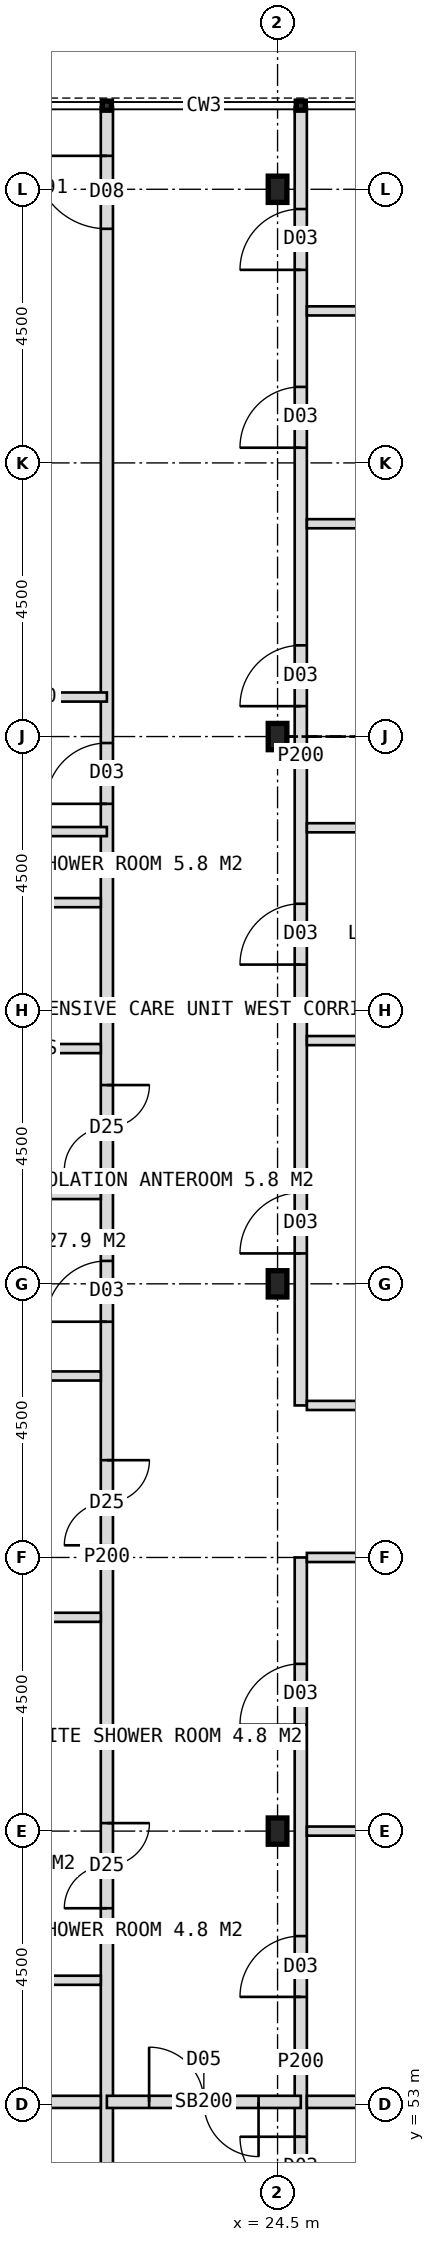
"""IFC4 building model, lengths in metres.
Left out: names, types, materials, properties, quantities, classifications, styles, units other than length and angle.
Written with IfcOpenShell. Run it as: python <this file> out.ifc"""

import sys

from ifc_helpers import new_model, si_unit, direction, frame, frame_2d, origin, origin_2d, place, context, subcontext, project, spatial, rectangle, i_section, extrude, element, fill, save


model = new_model("IFC4")
c1 = context("Model", 3, precision=1e-05, world=origin(), true_north=direction((0.0, 1.0)))
c2 = subcontext(c1, "Body", "Model", "MODEL_VIEW")
j1 = project(units=[si_unit("LENGTHUNIT", "METRE"), si_unit("PLANEANGLEUNIT", "RADIAN")], contexts=[c1])
p1 = place(None, origin())
s1 = spatial("IfcSite", under=j1, at=p1, CompositionType="ELEMENT")
p2 = place(p1, origin())
s2 = spatial("IfcBuilding", under=s1, at=p2, CompositionType="ELEMENT")
p3 = place(p2, frame((0.0, 0.0, 21.0)))
s3 = spatial("IfcBuildingStorey", under=s2, at=p3, CompositionType="ELEMENT", Elevation=21.0)
for number, where, z_axis, x_axis in (
    (1, (24.5, 57.5, 0.0), (0.0, 0.0, 1.0), (1.0, 0.0, 0.0)),
    (2, (24.5, 66.5, 0.0), (0.0, 0.0, 1.0), (1.0, 0.0, 0.0)),
    (3, (24.5, 75.5, 0.0), (0.0, 0.0, 1.0), (1.0, 0.0, 0.0)),
    (4, (24.5, 84.5, 0.0), (0.0, 0.0, 1.0), (1.0, 0.0, 0.0)),
):
    element("IfcColumn", number, at=place(p3, frame(where, z_axis=z_axis, x_axis=x_axis)), inside=s3, PredefinedType="COLUMN", context=c2, shape_type="SweptSolid", body=[
        extrude(i_section(OverallWidth=0.307, OverallDepth=0.432, WebThickness=0.021, FlangeThickness=0.04, FilletRadius=0.027, at=origin_2d()), origin(), (0.0, 0.0, 1.0), 5.0),
    ])
p4 = place(p3, frame((21.693, 38.15, 0.0), z_axis=(0.0, 0.0, 1.0), x_axis=(0.0, 1.0, 0.0)))
e5 = element("IfcWall", 5, at=p4, inside=s3, PredefinedType="PARTITIONING", context=c2, shape_type="SweptSolid", body=[
    extrude(rectangle(XDim=47.7, YDim=0.2, at=frame_2d((23.85, 0.0))), origin(), (0.0, 0.0, 1.0), 4.7),
])
p5 = place(p4, frame((45.7, 0.0, 0.0)))
e6 = element("IfcOpeningElement", 6, at=p5, cuts=e5, PredefinedType="OPENING", context=c2, shape_type="SweptSolid", body=[
    extrude(rectangle(XDim=1.2, YDim=2.1, at=frame_2d((0.6, 1.05))), frame((0.0, 0.11, 0.0), z_axis=(0.0, -1.0, 0.0), x_axis=(1.0, 0.0, 0.0)), (0.0, 0.0, 1.0), 0.22),
])
p6 = place(p4, frame((36.244, 0.0, 0.0)))
e7 = element("IfcOpeningElement", 7, at=p6, cuts=e5, PredefinedType="OPENING", context=c2, shape_type="SweptSolid", body=[
    extrude(rectangle(XDim=1.0, YDim=2.1, at=frame_2d((0.5, 1.05))), frame((0.0, 0.11, 0.0), z_axis=(0.0, -1.0, 0.0), x_axis=(1.0, 0.0, 0.0)), (0.0, 0.0, 1.0), 0.22),
])
p7 = place(p4, frame((0.5, 0.0, 0.0)))
e8 = element("IfcOpeningElement", 8, at=p7, cuts=e5, PredefinedType="OPENING", context=c2, shape_type="SweptSolid", body=[
    extrude(rectangle(XDim=1.4, YDim=2.2, at=frame_2d((0.7, 1.1))), frame((0.0, 0.11, 0.0), z_axis=(0.0, -1.0, 0.0), x_axis=(1.0, 0.0, 0.0)), (0.0, 0.0, 1.0), 0.22),
])
p8 = place(p4, frame((30.219, 0.0, 0.0)))
e9 = element("IfcOpeningElement", 9, at=p8, cuts=e5, PredefinedType="OPENING", context=c2, shape_type="SweptSolid", body=[
    extrude(rectangle(XDim=1.4, YDim=2.2, at=frame_2d((0.7, 1.1))), frame((0.0, 0.11, 0.0), z_axis=(0.0, -1.0, 0.0), x_axis=(1.0, 0.0, 0.0)), (0.0, 0.0, 1.0), 0.22),
])
p9 = place(p4, frame((9.128, 0.0, 0.0)))
e10 = element("IfcOpeningElement", 10, at=p9, cuts=e5, PredefinedType="OPENING", context=c2, shape_type="SweptSolid", body=[
    extrude(rectangle(XDim=1.4, YDim=2.2, at=frame_2d((0.7, 1.1))), frame((0.0, 0.11, 0.0), z_axis=(0.0, -1.0, 0.0), x_axis=(1.0, 0.0, 0.0)), (0.0, 0.0, 1.0), 0.22),
])
p10 = place(p4, frame((12.805, 0.0, 0.0)))
e11 = element("IfcOpeningElement", 11, at=p10, cuts=e5, PredefinedType="OPENING", context=c2, shape_type="SweptSolid", body=[
    extrude(rectangle(XDim=1.0, YDim=2.1, at=frame_2d((0.5, 1.05))), frame((0.0, 0.11, 0.0), z_axis=(0.0, -1.0, 0.0), x_axis=(1.0, 0.0, 0.0)), (0.0, 0.0, 1.0), 0.22),
])
p11 = place(p4, frame((18.081, 0.0, 0.0)))
e12 = element("IfcOpeningElement", 12, at=p11, cuts=e5, PredefinedType="OPENING", context=c2, shape_type="SweptSolid", body=[
    extrude(rectangle(XDim=1.4, YDim=2.2, at=frame_2d((0.7, 1.1))), frame((0.0, 0.11, 0.0), z_axis=(0.0, -1.0, 0.0), x_axis=(1.0, 0.0, 0.0)), (0.0, 0.0, 1.0), 0.22),
])
p12 = place(p4, frame((24.05, 0.0, 0.0)))
e13 = element("IfcOpeningElement", 13, at=p12, cuts=e5, PredefinedType="OPENING", context=c2, shape_type="SweptSolid", body=[
    extrude(rectangle(XDim=1.4, YDim=2.2, at=frame_2d((0.7, 1.1))), frame((0.0, 0.11, 0.0), z_axis=(0.0, -1.0, 0.0), x_axis=(1.0, 0.0, 0.0)), (0.0, 0.0, 1.0), 0.22),
])
p13 = place(p4, frame((27.727, 0.0, 0.0)))
e14 = element("IfcOpeningElement", 14, at=p13, cuts=e5, PredefinedType="OPENING", context=c2, shape_type="SweptSolid", body=[
    extrude(rectangle(XDim=1.0, YDim=2.1, at=frame_2d((0.5, 1.05))), frame((0.0, 0.11, 0.0), z_axis=(0.0, -1.0, 0.0), x_axis=(1.0, 0.0, 0.0)), (0.0, 0.0, 1.0), 0.22),
])
p14 = place(p3, frame((24.882, 45.4, 0.0), z_axis=(0.0, 0.0, 1.0), x_axis=(0.0, 1.0, 0.0)))
e15 = element("IfcWall", 15, at=p14, inside=s3, PredefinedType="PARTITIONING", context=c2, shape_type="SweptSolid", body=[
    extrude(rectangle(XDim=16.6, YDim=0.2, at=frame_2d((8.3, 0.0))), origin(), (0.0, 0.0, 1.0), 4.7),
])
p15 = place(p14, frame((1.15, 0.0, 0.0)))
e16 = element("IfcOpeningElement", 16, at=p15, cuts=e15, PredefinedType="OPENING", context=c2, shape_type="SweptSolid", body=[
    extrude(rectangle(XDim=1.6, YDim=2.2, at=frame_2d((0.8, 1.1))), frame((0.0, 0.11, 0.0), z_axis=(0.0, -1.0, 0.0), x_axis=(1.0, 0.0, 0.0)), (0.0, 0.0, 1.0), 0.22),
])
p16 = place(p14, frame((6.073, 0.0, 0.0)))
e17 = element("IfcOpeningElement", 17, at=p16, cuts=e15, PredefinedType="OPENING", context=c2, shape_type="SweptSolid", body=[
    extrude(rectangle(XDim=1.0, YDim=2.1, at=frame_2d((0.5, 1.05))), frame((0.0, 0.11, 0.0), z_axis=(0.0, -1.0, 0.0), x_axis=(1.0, 0.0, 0.0)), (0.0, 0.0, 1.0), 0.22),
])
p17 = place(p14, frame((9.374, 0.0, 0.0)))
e18 = element("IfcOpeningElement", 18, at=p17, cuts=e15, PredefinedType="OPENING", context=c2, shape_type="SweptSolid", body=[
    extrude(rectangle(XDim=1.0, YDim=2.1, at=frame_2d((0.5, 1.05))), frame((0.0, 0.11, 0.0), z_axis=(0.0, -1.0, 0.0), x_axis=(1.0, 0.0, 0.0)), (0.0, 0.0, 1.0), 0.22),
])
p18 = place(p14, frame((13.85, 0.0, 0.0)))
e19 = element("IfcOpeningElement", 19, at=p18, cuts=e15, PredefinedType="OPENING", context=c2, shape_type="SweptSolid", body=[
    extrude(rectangle(XDim=1.0, YDim=2.1, at=frame_2d((0.5, 1.05))), frame((0.0, 0.11, 0.0), z_axis=(0.0, -1.0, 0.0), x_axis=(1.0, 0.0, 0.0)), (0.0, 0.0, 1.0), 0.22),
])
p19 = place(p3, frame((24.882, 64.5, 0.0), z_axis=(0.0, 0.0, 1.0), x_axis=(0.0, 1.0, 0.0)))
e20 = element("IfcWall", 20, at=p19, inside=s3, PredefinedType="PARTITIONING", context=c2, shape_type="SweptSolid", body=[
    extrude(rectangle(XDim=21.35, YDim=0.2, at=frame_2d((10.675, 0.0))), origin(), (0.0, 0.0, 1.0), 4.7),
])
p20 = place(p19, frame((2.5, 0.0, 0.0)))
e21 = element("IfcOpeningElement", 21, at=p20, cuts=e20, PredefinedType="OPENING", context=c2, shape_type="SweptSolid", body=[
    extrude(rectangle(XDim=1.0, YDim=2.1, at=frame_2d((0.5, 1.05))), frame((0.0, 0.11, 0.0), z_axis=(0.0, -1.0, 0.0), x_axis=(1.0, 0.0, 0.0)), (0.0, 0.0, 1.0), 0.22),
])
p21 = place(p19, frame((7.25, 0.0, 0.0)))
e22 = element("IfcOpeningElement", 22, at=p21, cuts=e20, PredefinedType="OPENING", context=c2, shape_type="SweptSolid", body=[
    extrude(rectangle(XDim=1.0, YDim=2.1, at=frame_2d((0.5, 1.05))), frame((0.0, 0.11, 0.0), z_axis=(0.0, -1.0, 0.0), x_axis=(1.0, 0.0, 0.0)), (0.0, 0.0, 1.0), 0.22),
])
p22 = place(p19, frame((11.5, 0.0, 0.0)))
e23 = element("IfcOpeningElement", 23, at=p22, cuts=e20, PredefinedType="OPENING", context=c2, shape_type="SweptSolid", body=[
    extrude(rectangle(XDim=1.0, YDim=2.1, at=frame_2d((0.5, 1.05))), frame((0.0, 0.11, 0.0), z_axis=(0.0, -1.0, 0.0), x_axis=(1.0, 0.0, 0.0)), (0.0, 0.0, 1.0), 0.22),
])
p23 = place(p19, frame((15.75, 0.0, 0.0)))
e24 = element("IfcOpeningElement", 24, at=p23, cuts=e20, PredefinedType="OPENING", context=c2, shape_type="SweptSolid", body=[
    extrude(rectangle(XDim=1.0, YDim=2.1, at=frame_2d((0.5, 1.05))), frame((0.0, 0.11, 0.0), z_axis=(0.0, -1.0, 0.0), x_axis=(1.0, 0.0, 0.0)), (0.0, 0.0, 1.0), 0.22),
])
p24 = place(p19, frame((18.675, 0.0, 0.0)))
e25 = element("IfcOpeningElement", 25, at=p24, cuts=e20, PredefinedType="OPENING", context=c2, shape_type="SweptSolid", body=[
    extrude(rectangle(XDim=1.0, YDim=2.1, at=frame_2d((0.5, 1.05))), frame((0.0, 0.11, 0.0), z_axis=(0.0, -1.0, 0.0), x_axis=(1.0, 0.0, 0.0)), (0.0, 0.0, 1.0), 0.22),
])
p25 = place(p3, frame((21.693, 53.047, 0.0), z_axis=(0.0, 0.0, 1.0), x_axis=(1.0, 0.0, 0.0)))
e26 = element("IfcWall", 26, at=p25, inside=s3, PredefinedType="SOLIDWALL", context=c2, shape_type="SweptSolid", body=[
    extrude(rectangle(XDim=3.189, YDim=0.2, at=frame_2d((1.594, 0.0))), origin(), (0.0, 0.0, 1.0), 4.7),
])
p26 = place(p25, frame((0.695, 0.0, 0.0)))
e27 = element("IfcOpeningElement", 27, at=p26, cuts=e26, PredefinedType="OPENING", context=c2, shape_type="SweptSolid", body=[
    extrude(rectangle(XDim=1.8, YDim=2.2, at=frame_2d((0.9, 1.1))), frame((0.0, 0.11, 0.0), z_axis=(0.0, -1.0, 0.0), x_axis=(1.0, 0.0, 0.0)), (0.0, 0.0, 1.0), 0.22),
])
p27 = place(p3, frame((19.3, 76.15, 0.0), z_axis=(0.0, 0.0, 1.0), x_axis=(1.0, 0.0, 0.0)))
e28 = element("IfcWall", 28, at=p27, inside=s3, PredefinedType="PARTITIONING", context=c2, shape_type="SweptSolid", body=[
    extrude(rectangle(XDim=2.393, YDim=0.15, at=frame_2d((1.197, 0.0))), origin(), (0.0, 0.0, 1.0), 4.7),
])
p28 = place(p3, frame((12.15, 73.938, 0.0), z_axis=(0.0, 0.0, 1.0), x_axis=(1.0, 0.0, 0.0)))
e29 = element("IfcWall", 29, at=p28, inside=s3, PredefinedType="PARTITIONING", context=c2, shape_type="SweptSolid", body=[
    extrude(rectangle(XDim=9.543, YDim=0.15, at=frame_2d((4.771, 0.0))), origin(), (0.0, 0.0, 1.0), 4.7),
])
p29 = place(p3, frame((12.15, 53.047, 0.0), z_axis=(0.0, 0.0, 1.0), x_axis=(1.0, 0.0, 0.0)))
e30 = element("IfcWall", 30, at=p29, inside=s3, PredefinedType="SOLIDWALL", context=c2, shape_type="SweptSolid", body=[
    extrude(rectangle(XDim=9.443, YDim=0.2, at=frame_2d((4.722, 0.0))), origin(), (0.0, 0.0, 1.0), 4.7),
])
for number, where, z_axis, x_axis in (
    (31, (12.15, 59.016, 0.0), (0.0, 0.0, 1.0), (1.0, 0.0, 0.0)),
    (32, (12.15, 64.984, 0.0), (0.0, 0.0, 1.0), (1.0, 0.0, 0.0)),
    (33, (12.15, 67.969, 0.0), (0.0, 0.0, 1.0), (1.0, 0.0, 0.0)),
):
    element("IfcWall", number, at=place(p3, frame(where, z_axis=z_axis, x_axis=x_axis)), inside=s3, PredefinedType="PARTITIONING", context=c2, shape_type="SweptSolid", body=[
        extrude(rectangle(XDim=9.443, YDim=0.15, at=frame_2d((4.722, 0.0))), origin(), (0.0, 0.0, 1.0), 4.7),
    ])
for number, where, z_axis, x_axis in (
    (34, (21.593, 55.047, 0.0), (0.0, 0.0, 1.0), (-1.0, 0.0, 0.0)),
    (35, (21.593, 61.016, 0.0), (0.0, 0.0, 1.0), (-1.0, 0.0, 0.0)),
    (36, (21.593, 70.369, 0.0), (0.0, 0.0, 1.0), (-1.0, 0.0, 0.0)),
    (37, (21.593, 72.769, 0.0), (0.0, 0.0, 1.0), (-1.0, 0.0, 0.0)),
):
    element("IfcWall", number, at=place(p3, frame(where, z_axis=z_axis, x_axis=x_axis)), inside=s3, PredefinedType="PARTITIONING", context=c2, shape_type="SweptSolid", body=[
        extrude(rectangle(XDim=2.4, YDim=0.15, at=frame_2d((1.2, 0.0))), origin(), (0.0, 0.0, 1.0), 4.7),
    ])
p30 = place(p3, frame((24.982, 53.047, 0.0), z_axis=(0.0, 0.0, 1.0), x_axis=(1.0, 0.0, 0.0)))
e38 = element("IfcWall", 38, at=p30, inside=s3, PredefinedType="SOLIDWALL", context=c2, shape_type="SweptSolid", body=[
    extrude(rectangle(XDim=9.168, YDim=0.2, at=frame_2d((4.584, 0.0))), origin(), (0.0, 0.0, 1.0), 4.7),
])
p31 = place(p3, frame((24.982, 57.5, 0.0), z_axis=(0.0, 0.0, 1.0), x_axis=(1.0, 0.0, 0.0)))
e39 = element("IfcWall", 39, at=p31, inside=s3, PredefinedType="PARTITIONING", context=c2, shape_type="SweptSolid", body=[
    extrude(rectangle(XDim=8.365, YDim=0.15, at=frame_2d((4.182, 0.0))), origin(), (0.0, 0.0, 1.0), 3.7),
])
for number, where, z_axis, x_axis in (
    (40, (24.982, 62.0, 0.0), (0.0, 0.0, 1.0), (1.0, 0.0, 0.0)),
    (41, (24.982, 64.5, 0.0), (0.0, 0.0, 1.0), (1.0, 0.0, 0.0)),
    (42, (24.982, 70.5, 0.0), (0.0, 0.0, 1.0), (1.0, 0.0, 0.0)),
    (43, (24.982, 74.0, 0.0), (0.0, 0.0, 1.0), (1.0, 0.0, 0.0)),
    (44, (24.982, 79.0, 0.0), (0.0, 0.0, 1.0), (1.0, 0.0, 0.0)),
    (45, (24.982, 82.5, 0.0), (0.0, 0.0, 1.0), (1.0, 0.0, 0.0)),
):
    element("IfcWall", number, at=place(p3, frame(where, z_axis=z_axis, x_axis=x_axis)), inside=s3, PredefinedType="PARTITIONING", context=c2, shape_type="SweptSolid", body=[
        extrude(rectangle(XDim=9.168, YDim=0.15, at=frame_2d((4.584, 0.0))), origin(), (0.0, 0.0, 1.0), 4.7),
    ])
p32 = place(p26, origin())
e46 = element("IfcDoor", 46, at=p32, inside=s3, OperationType="DOUBLE_DOOR_DOUBLE_SWING", PredefinedType="DOOR", context=c2, shape_type="SweptSolid", body=[
    extrude(rectangle(XDim=1.8, YDim=2.2, at=frame_2d((0.9, 1.1))), frame((0.0, 0.025, 0.0), z_axis=(0.0, -1.0, 0.0), x_axis=(1.0, 0.0, 0.0)), (0.0, 0.0, 1.0), 0.05),
])
fill(e27, e46)
p33 = place(p5, origin())
e47 = element("IfcDoor", 47, at=p33, inside=s3, OperationType="SINGLE_SWING_RIGHT", PredefinedType="DOOR", context=c2, shape_type="SweptSolid", body=[
    extrude(rectangle(XDim=1.2, YDim=2.1, at=frame_2d((0.6, 1.05))), frame((0.0, 0.025, 0.0), z_axis=(0.0, -1.0, 0.0), x_axis=(1.0, 0.0, 0.0)), (0.0, 0.0, 1.0), 0.05),
])
fill(e6, e47)
p34 = place(p6, origin())
e48 = element("IfcDoor", 48, at=p34, inside=s3, OperationType="SINGLE_SWING_LEFT", PredefinedType="DOOR", context=c2, shape_type="SweptSolid", body=[
    extrude(rectangle(XDim=1.0, YDim=2.1, at=frame_2d((0.5, 1.05))), frame((0.0, 0.025, 0.0), z_axis=(0.0, -1.0, 0.0), x_axis=(1.0, 0.0, 0.0)), (0.0, 0.0, 1.0), 0.05),
])
fill(e7, e48)
p35 = place(p8, origin())
e49 = element("IfcDoor", 49, at=p35, inside=s3, OperationType="DOUBLE_DOOR_SINGLE_SWING", PredefinedType="DOOR", context=c2, shape_type="SweptSolid", body=[
    extrude(rectangle(XDim=1.4, YDim=2.2, at=frame_2d((0.7, 1.1))), frame((0.0, 0.025, 0.0), z_axis=(0.0, -1.0, 0.0), x_axis=(1.0, 0.0, 0.0)), (0.0, 0.0, 1.0), 0.05),
])
fill(e9, e49)
p36 = place(p11, origin())
e50 = element("IfcDoor", 50, at=p36, inside=s3, OperationType="DOUBLE_DOOR_SINGLE_SWING", PredefinedType="DOOR", context=c2, shape_type="SweptSolid", body=[
    extrude(rectangle(XDim=1.4, YDim=2.2, at=frame_2d((0.7, 1.1))), frame((0.0, 0.025, 0.0), z_axis=(0.0, -1.0, 0.0), x_axis=(1.0, 0.0, 0.0)), (0.0, 0.0, 1.0), 0.05),
])
fill(e12, e50)
p37 = place(p12, origin())
e51 = element("IfcDoor", 51, at=p37, inside=s3, OperationType="DOUBLE_DOOR_SINGLE_SWING", PredefinedType="DOOR", context=c2, shape_type="SweptSolid", body=[
    extrude(rectangle(XDim=1.4, YDim=2.2, at=frame_2d((0.7, 1.1))), frame((0.0, 0.025, 0.0), z_axis=(0.0, -1.0, 0.0), x_axis=(1.0, 0.0, 0.0)), (0.0, 0.0, 1.0), 0.05),
])
fill(e13, e51)
p38 = place(p13, origin())
e52 = element("IfcDoor", 52, at=p38, inside=s3, OperationType="SINGLE_SWING_LEFT", PredefinedType="DOOR", context=c2, shape_type="SweptSolid", body=[
    extrude(rectangle(XDim=1.0, YDim=2.1, at=frame_2d((0.5, 1.05))), frame((0.0, 0.025, 0.0), z_axis=(0.0, -1.0, 0.0), x_axis=(1.0, 0.0, 0.0)), (0.0, 0.0, 1.0), 0.05),
])
fill(e14, e52)
p39 = place(p16, origin())
e53 = element("IfcDoor", 53, at=p39, inside=s3, OperationType="SINGLE_SWING_RIGHT", PredefinedType="DOOR", context=c2, shape_type="SweptSolid", body=[
    extrude(rectangle(XDim=1.0, YDim=2.1, at=frame_2d((0.5, 1.05))), frame((0.0, 0.025, 0.0), z_axis=(0.0, -1.0, 0.0), x_axis=(1.0, 0.0, 0.0)), (0.0, 0.0, 1.0), 0.05),
])
fill(e17, e53)
p40 = place(p17, origin())
e54 = element("IfcDoor", 54, at=p40, inside=s3, OperationType="SINGLE_SWING_LEFT", PredefinedType="DOOR", context=c2, shape_type="SweptSolid", body=[
    extrude(rectangle(XDim=1.0, YDim=2.1, at=frame_2d((0.5, 1.05))), frame((0.0, 0.025, 0.0), z_axis=(0.0, -1.0, 0.0), x_axis=(1.0, 0.0, 0.0)), (0.0, 0.0, 1.0), 0.05),
])
fill(e18, e54)
p41 = place(p18, origin())
e55 = element("IfcDoor", 55, at=p41, inside=s3, OperationType="SINGLE_SWING_LEFT", PredefinedType="DOOR", context=c2, shape_type="SweptSolid", body=[
    extrude(rectangle(XDim=1.0, YDim=2.1, at=frame_2d((0.5, 1.05))), frame((0.0, 0.025, 0.0), z_axis=(0.0, -1.0, 0.0), x_axis=(1.0, 0.0, 0.0)), (0.0, 0.0, 1.0), 0.05),
])
fill(e19, e55)
p42 = place(p20, origin())
e56 = element("IfcDoor", 56, at=p42, inside=s3, OperationType="SINGLE_SWING_LEFT", PredefinedType="DOOR", context=c2, shape_type="SweptSolid", body=[
    extrude(rectangle(XDim=1.0, YDim=2.1, at=frame_2d((0.5, 1.05))), frame((0.0, 0.025, 0.0), z_axis=(0.0, -1.0, 0.0), x_axis=(1.0, 0.0, 0.0)), (0.0, 0.0, 1.0), 0.05),
])
fill(e21, e56)
p43 = place(p21, origin())
e57 = element("IfcDoor", 57, at=p43, inside=s3, OperationType="SINGLE_SWING_LEFT", PredefinedType="DOOR", context=c2, shape_type="SweptSolid", body=[
    extrude(rectangle(XDim=1.0, YDim=2.1, at=frame_2d((0.5, 1.05))), frame((0.0, 0.025, 0.0), z_axis=(0.0, -1.0, 0.0), x_axis=(1.0, 0.0, 0.0)), (0.0, 0.0, 1.0), 0.05),
])
fill(e22, e57)
p44 = place(p22, origin())
e58 = element("IfcDoor", 58, at=p44, inside=s3, OperationType="SINGLE_SWING_LEFT", PredefinedType="DOOR", context=c2, shape_type="SweptSolid", body=[
    extrude(rectangle(XDim=1.0, YDim=2.1, at=frame_2d((0.5, 1.05))), frame((0.0, 0.025, 0.0), z_axis=(0.0, -1.0, 0.0), x_axis=(1.0, 0.0, 0.0)), (0.0, 0.0, 1.0), 0.05),
])
fill(e23, e58)
p45 = place(p23, origin())
e59 = element("IfcDoor", 59, at=p45, inside=s3, OperationType="SINGLE_SWING_LEFT", PredefinedType="DOOR", context=c2, shape_type="SweptSolid", body=[
    extrude(rectangle(XDim=1.0, YDim=2.1, at=frame_2d((0.5, 1.05))), frame((0.0, 0.025, 0.0), z_axis=(0.0, -1.0, 0.0), x_axis=(1.0, 0.0, 0.0)), (0.0, 0.0, 1.0), 0.05),
])
fill(e24, e59)
p46 = place(p24, origin())
e60 = element("IfcDoor", 60, at=p46, inside=s3, OperationType="SINGLE_SWING_LEFT", PredefinedType="DOOR", context=c2, shape_type="SweptSolid", body=[
    extrude(rectangle(XDim=1.0, YDim=2.1, at=frame_2d((0.5, 1.05))), frame((0.0, 0.025, 0.0), z_axis=(0.0, -1.0, 0.0), x_axis=(1.0, 0.0, 0.0)), (0.0, 0.0, 1.0), 0.05),
])
fill(e25, e60)
save(model, sys.argv[1])
